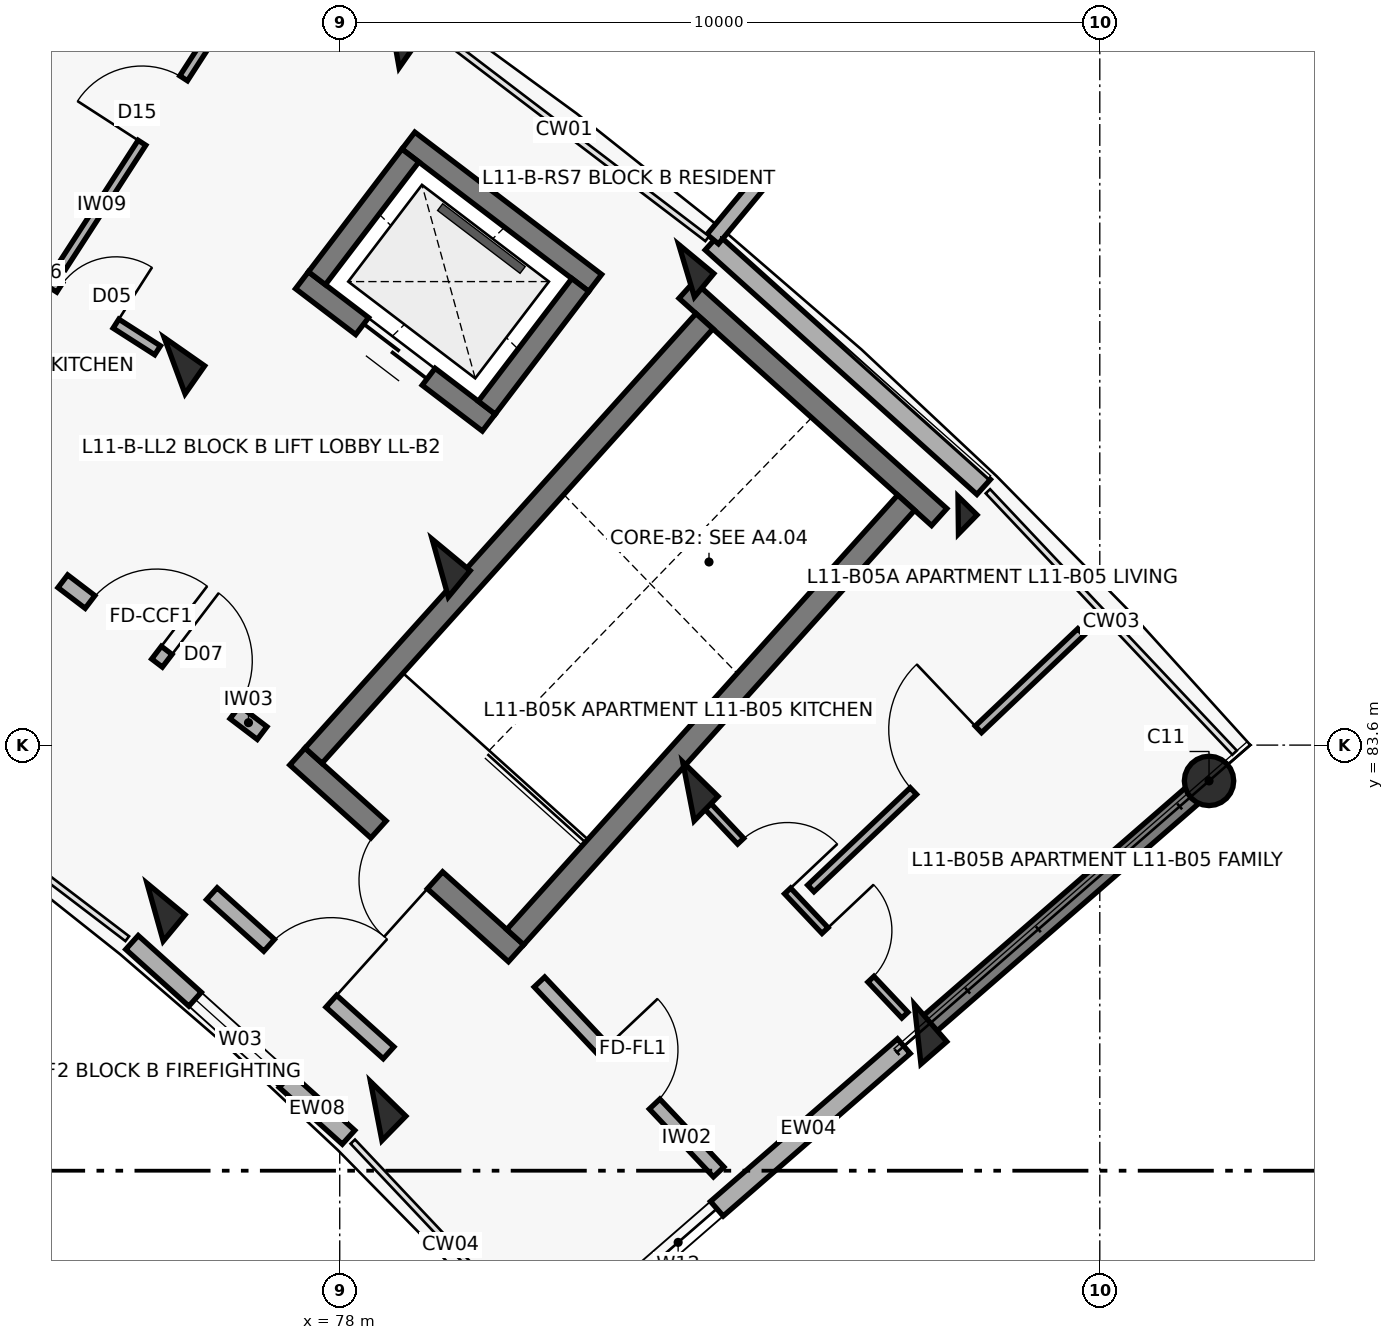
"""IFC4 building model, lengths in metres.
Left out: names, types, materials, properties, quantities, classifications, styles, units other than length and angle.
Written with IfcOpenShell. Run it as: python <this file> out.ifc"""

import sys

from ifc_helpers import new_model, si_unit, direction, frame, frame_2d, origin, origin_2d, place, context, subcontext, project, spatial, rectangle, circle, extrude, element, fill, save


model = new_model("IFC4")
c1 = context("Model", 3, precision=1e-05, world=origin(), true_north=direction((0.0, 1.0)))
c2 = subcontext(c1, "Body", "Model", "MODEL_VIEW")
j1 = project(units=[si_unit("LENGTHUNIT", "METRE"), si_unit("PLANEANGLEUNIT", "RADIAN")], contexts=[c1])
p1 = place(None, origin())
s1 = spatial("IfcSite", under=j1, at=p1, CompositionType="ELEMENT")
p2 = place(p1, origin())
s2 = spatial("IfcBuilding", under=s1, at=p2, CompositionType="ELEMENT")
p3 = place(p2, frame((0.0, 0.0, 36.0)))
s3 = spatial("IfcBuildingStorey", under=s2, at=p3, CompositionType="ELEMENT", Elevation=36.0)
p4 = place(p3, frame((75.828, 88.592, 0.0), z_axis=(0.0, 0.0, 1.0), x_axis=(0.573004420611, 0.819552276527, 0.0)))
e1 = element("IfcColumn", 1, at=p4, inside=s3, PredefinedType="COLUMN", context=c2, shape_type="SweptSolid", body=[
    extrude(rectangle(XDim=0.45, YDim=0.65, at=origin_2d()), origin(), (0.0, 0.0, 1.0), 3.1),
])
p5 = place(p3, frame((78.739, 92.755, 0.0), z_axis=(0.0, 0.0, 1.0), x_axis=(0.573004420611, 0.819552276527, 0.0)))
e2 = element("IfcColumn", 2, at=p5, inside=s3, PredefinedType="COLUMN", context=c2, shape_type="SweptSolid", body=[
    extrude(rectangle(XDim=0.35, YDim=0.35, at=origin_2d()), origin(), (0.0, 0.0, 1.0), 3.1),
])
for number, where, z_axis, x_axis in (
    (3, (75.571, 81.402, 0.0), (0.0, 0.0, 1.0), (0.638, 0.77, 0.0)),
    (4, (79.322, 85.93, 0.0), (0.0, 0.0, 1.0), (0.638, 0.77, 0.0)),
):
    element("IfcColumn", number, at=place(p3, frame(where, z_axis=z_axis, x_axis=x_axis)), inside=s3, PredefinedType="COLUMN", context=c2, shape_type="SweptSolid", body=[
        extrude(rectangle(XDim=0.45, YDim=0.65, at=origin_2d()), origin(), (0.0, 0.0, 1.0), 3.1),
    ])
p6 = place(p3, frame((82.563, 89.842, 0.0), z_axis=(0.0, 0.0, 1.0), x_axis=(0.637961754089, 0.770068049148, 0.0)))
e5 = element("IfcColumn", 5, at=p6, inside=s3, PredefinedType="COLUMN", context=c2, shape_type="SweptSolid", body=[
    extrude(rectangle(XDim=0.4, YDim=0.6, at=origin_2d()), origin(), (0.0, 0.0, 1.0), 3.1),
])
for number, where, z_axis, x_axis in (
    (6, (78.48, 78.784, 0.0), (0.0, 0.0, 1.0), (0.699, 0.715, 0.0)),
    (7, (82.588, 82.991, 0.0), (0.0, 0.0, 1.0), (0.699, 0.715, 0.0)),
):
    element("IfcColumn", number, at=place(p3, frame(where, z_axis=z_axis, x_axis=x_axis)), inside=s3, PredefinedType="COLUMN", context=c2, shape_type="SweptSolid", body=[
        extrude(rectangle(XDim=0.45, YDim=0.65, at=origin_2d()), origin(), (0.0, 0.0, 1.0), 3.1),
    ])
p7 = place(p3, frame((86.137, 86.626, 0.0), z_axis=(0.0, 0.0, 1.0), x_axis=(0.698665066769, 0.715448897181, 0.0)))
e8 = element("IfcColumn", 8, at=p7, inside=s3, PredefinedType="COLUMN", context=c2, shape_type="SweptSolid", body=[
    extrude(rectangle(XDim=0.35, YDim=0.35, at=origin_2d()), origin(), (0.0, 0.0, 1.0), 3.1),
])
p8 = place(p3, frame((85.603, 79.796, 0.0), z_axis=(0.0, 0.0, 1.0), x_axis=(0.754709580223, 0.656059028991, 0.0)))
e9 = element("IfcColumn", 9, at=p8, inside=s3, PredefinedType="COLUMN", context=c2, shape_type="SweptSolid", body=[
    extrude(rectangle(XDim=0.45, YDim=0.65, at=origin_2d()), origin(), (0.0, 0.0, 1.0), 3.1),
])
p9 = place(p3, frame((89.437, 83.129, 0.0), z_axis=(0.0, 0.0, 1.0), x_axis=(0.754709580223, 0.656059028991, 0.0)))
e10 = element("IfcColumn", 10, at=p9, inside=s3, PredefinedType="COLUMN", context=c2, shape_type="SweptSolid", body=[
    extrude(circle(Radius=0.325, at=origin_2d()), origin(), (0.0, 0.0, 1.0), 3.1),
])
p10 = place(p3, frame((85.739, 79.914, 0.0), z_axis=(0.0, 0.0, 1.0), x_axis=(0.754703505217, 0.65606601742, 0.0)))
e11 = element("IfcWall", 11, at=p10, inside=s3, PredefinedType="SHEAR", context=c2, shape_type="SweptSolid", body=[
    extrude(rectangle(XDim=4.72, YDim=0.27, at=frame_2d((2.36, 0.0))), origin(), (0.0, 0.0, 1.0), 2.92),
])
p11 = place(p3, frame((82.897, 90.213, 0.0), z_axis=(0.0, 0.0, 1.0), x_axis=(0.743387539862, -0.668860946369, 0.0)))
e12 = element("IfcWall", 12, at=p11, inside=s3, PredefinedType="SOLIDWALL", context=c2, shape_type="SweptSolid", body=[
    extrude(rectangle(XDim=4.809, YDim=0.265, at=frame_2d((2.405, 0.0))), origin(), (0.0, 0.0, 1.0), 2.25),
])
p12 = place(p3, frame((82.908, 90.257, 0.0), z_axis=(0.0, 0.0, 1.0), x_axis=(0.637967316825, 0.770063440674, 0.0)))
e13 = element("IfcWall", 13, at=p12, inside=s3, PredefinedType="PARAPET", context=c2, shape_type="SweptSolid", body=[
    extrude(rectangle(XDim=0.9, YDim=0.195, at=frame_2d((0.45, 0.0))), origin(), (0.0, 0.0, 1.0), 2.25),
])
p13 = place(p3, frame((75.267, 81.003, 0.0), z_axis=(0.0, 0.0, 1.0), x_axis=(0.743363835609, -0.668887290886, 0.0)))
e14 = element("IfcWall", 14, at=p13, inside=s3, PredefinedType="SOLIDWALL", context=c2, shape_type="SweptSolid", body=[
    extrude(rectangle(XDim=3.832, YDim=0.245, at=frame_2d((1.916, 0.0))), origin(), (0.0, 0.0, 1.0), 2.25),
])
p14 = place(p13, frame((1.116, 0.0, 0.32)))
e15 = element("IfcOpeningElement", 15, at=p14, cuts=e14, PredefinedType="OPENING", context=c2, shape_type="SweptSolid", body=[
    extrude(rectangle(XDim=1.6, YDim=1.5, at=frame_2d((0.8, 0.75))), frame((0.0, 0.133, 0.0), z_axis=(0.0, -1.0, 0.0), x_axis=(1.0, 0.0, 0.0)), (0.0, 0.0, 1.0), 0.265),
])
p15 = place(p3, frame((81.347, 76.096, 0.0), z_axis=(0.0, 0.0, 1.0), x_axis=(0.754709658894, 0.65605893849, 0.0)))
e16 = element("IfcWall", 16, at=p15, inside=s3, PredefinedType="SOLIDWALL", context=c2, shape_type="SweptSolid", body=[
    extrude(rectangle(XDim=5.4, YDim=0.255, at=frame_2d((2.7, 0.0))), origin(), (0.0, 0.0, 1.0), 2.24),
])
p16 = place(p15, frame((0.79, 0.0, 0.75)))
e17 = element("IfcOpeningElement", 17, at=p16, cuts=e16, PredefinedType="OPENING", context=c2, shape_type="SweptSolid", body=[
    extrude(rectangle(XDim=1.35, YDim=1.35, at=frame_2d((0.675, 0.675))), frame((0.0, 0.137, 0.0), z_axis=(0.0, -1.0, 0.0), x_axis=(1.0, 0.0, 0.0)), (0.0, 0.0, 1.0), 0.275),
])
p17 = place(p3, frame((80.32, 80.862, 0.0), z_axis=(0.0, 0.0, 1.0), x_axis=(-0.743375696158, 0.668874109501, 0.0)))
e18 = element("IfcWall", 18, at=p17, inside=s3, PredefinedType="SHEAR", context=c2, shape_type="SweptSolid", body=[
    extrude(rectangle(XDim=3.87, YDim=0.3, at=frame_2d((1.935, 0.0))), origin(), (0.0, 0.0, 1.0), 3.1),
])
p18 = place(p17, frame((1.435, 0.0, 0.0)))
e19 = element("IfcOpeningElement", 19, at=p18, cuts=e18, PredefinedType="OPENING", context=c2, shape_type="SweptSolid", body=[
    extrude(rectangle(XDim=1.0, YDim=2.15, at=frame_2d((0.5, 1.075))), frame((0.0, 0.16, 0.0), z_axis=(0.0, -1.0, 0.0), x_axis=(1.0, 0.0, 0.0)), (0.0, 0.0, 1.0), 0.32),
])
p19 = place(p3, frame((85.887, 86.601, 0.0), z_axis=(0.0, 0.0, 1.0), x_axis=(-0.743400052815, 0.668847038922, 0.0)))
e20 = element("IfcWall", 20, at=p19, inside=s3, PredefinedType="SHEAR", context=c2, shape_type="SweptSolid", body=[
    extrude(rectangle(XDim=4.47, YDim=0.3, at=frame_2d((2.235, 0.0))), origin(), (0.0, 0.0, 1.0), 3.1),
])
p20 = place(p3, frame((80.309, 81.073, 0.0), z_axis=(0.0, 0.0, 1.0), x_axis=(0.668885797871, 0.743365179038, 0.0)))
e21 = element("IfcWall", 21, at=p20, inside=s3, PredefinedType="SHEAR", context=c2, shape_type="SweptSolid", body=[
    extrude(rectangle(XDim=7.69, YDim=0.3, at=frame_2d((3.845, 0.0))), origin(), (0.0, 0.0, 1.0), 3.1),
])
p21 = place(p3, frame((77.655, 83.461, 0.0), z_axis=(0.0, 0.0, 1.0), x_axis=(0.668868253964, 0.743380964808, 0.0)))
e22 = element("IfcWall", 22, at=p21, inside=s3, PredefinedType="SHEAR", context=c2, shape_type="SweptSolid", body=[
    extrude(rectangle(XDim=7.69, YDim=0.3, at=frame_2d((3.845, 0.0))), origin(), (0.0, 0.0, 1.0), 3.1),
])
p22 = place(p3, frame((79.961, 87.844, 0.0), z_axis=(0.0, 0.0, 1.0), x_axis=(-0.795464365424, 0.606000365793, 0.0)))
e23 = element("IfcWall", 23, at=p22, inside=s3, PredefinedType="SHEAR", context=c2, shape_type="SweptSolid", body=[
    extrude(rectangle(XDim=3.09, YDim=0.28, at=frame_2d((1.545, 0.0))), origin(), (0.0, 0.0, 1.0), 3.1),
])
p23 = place(p22, frame((0.995, 0.0, 0.0)))
e24 = element("IfcOpeningElement", 24, at=p23, cuts=e23, PredefinedType="OPENING", context=c2, shape_type="SweptSolid", body=[
    extrude(rectangle(XDim=1.1, YDim=2.15, at=frame_2d((0.55, 1.075))), frame((0.0, 0.15, 0.0), z_axis=(0.0, -1.0, 0.0), x_axis=(1.0, 0.0, 0.0)), (0.0, 0.0, 1.0), 0.3),
])
p24 = place(p3, frame((81.361, 89.681, 0.0), z_axis=(0.0, 0.0, 1.0), x_axis=(-0.795502452183, 0.605950368076, 0.0)))
e25 = element("IfcWall", 25, at=p24, inside=s3, PredefinedType="SHEAR", context=c2, shape_type="SweptSolid", body=[
    extrude(rectangle(XDim=3.09, YDim=0.28, at=frame_2d((1.545, 0.0))), origin(), (0.0, 0.0, 1.0), 3.1),
])
for number, where, z_axis, x_axis in (
    (26, (79.935, 88.04, 0.0), (0.0, 0.0, 1.0), (0.606, 0.795, 0.0)),
    (27, (77.699, 89.743, 0.0), (0.0, 0.0, 1.0), (0.606, 0.795, 0.0)),
):
    element("IfcWall", number, at=place(p3, frame(where, z_axis=z_axis, x_axis=x_axis)), inside=s3, PredefinedType="SHEAR", context=c2, shape_type="SweptSolid", body=[
        extrude(rectangle(XDim=2.03, YDim=0.28, at=frame_2d((1.015, 0.0))), origin(), (0.0, 0.0, 1.0), 3.1),
    ])
p25 = place(p3, frame((72.405, 90.842, 0.0), z_axis=(0.0, 0.0, 1.0), x_axis=(0.842271400662, -0.539053696423, 0.0)))
e28 = element("IfcWall", 28, at=p25, inside=s3, PredefinedType="PARTITIONING", context=c2, shape_type="SweptSolid", body=[
    extrude(rectangle(XDim=3.797, YDim=0.14, at=frame_2d((1.898, 0.0))), origin(), (0.0, 0.0, 1.0), 2.14),
])
p26 = place(p25, frame((0.65, 0.0, 0.0)))
e29 = element("IfcOpeningElement", 29, at=p26, cuts=e28, PredefinedType="OPENING", context=c2, shape_type="SweptSolid", body=[
    extrude(rectangle(XDim=0.9, YDim=2.1, at=frame_2d((0.45, 1.05))), frame((0.0, 0.08, 0.0), z_axis=(0.0, -1.0, 0.0), x_axis=(1.0, 0.0, 0.0)), (0.0, 0.0, 1.0), 0.16),
])
p27 = place(p25, frame((2.267, 0.0, 0.0)))
e30 = element("IfcOpeningElement", 30, at=p27, cuts=e28, PredefinedType="OPENING", context=c2, shape_type="SweptSolid", body=[
    extrude(rectangle(XDim=0.88, YDim=2.1, at=frame_2d((0.44, 1.05))), frame((0.0, 0.08, 0.0), z_axis=(0.0, -1.0, 0.0), x_axis=(1.0, 0.0, 0.0)), (0.0, 0.0, 1.0), 0.16),
])
p28 = place(p3, frame((74.342, 89.892, 0.0), z_axis=(0.0, 0.0, 1.0), x_axis=(0.542871109654, 0.839816026462, 0.0)))
e31 = element("IfcWall", 31, at=p28, inside=s3, PredefinedType="PARTITIONING", context=c2, shape_type="SweptSolid", body=[
    extrude(rectangle(XDim=4.9, YDim=0.12, at=frame_2d((2.45, 0.0))), origin(), (0.0, 0.0, 1.0), 2.14),
])
p29 = place(p28, frame((1.945, 0.0, 0.0)))
e32 = element("IfcOpeningElement", 32, at=p29, cuts=e31, PredefinedType="OPENING", context=c2, shape_type="SweptSolid", body=[
    extrude(rectangle(XDim=1.01, YDim=2.1, at=frame_2d((0.505, 1.05))), frame((0.0, 0.07, 0.0), z_axis=(0.0, -1.0, 0.0), x_axis=(1.0, 0.0, 0.0)), (0.0, 0.0, 1.0), 0.14),
])
p30 = place(p3, frame((72.379, 91.392, 0.0), z_axis=(0.0, 0.0, 1.0), x_axis=(0.504216452091, 0.863577309475, 0.0)))
e33 = element("IfcWall", 33, at=p30, inside=s3, PredefinedType="SOLIDWALL", context=c2, shape_type="SweptSolid", body=[
    extrude(rectangle(XDim=4.35, YDim=0.185, at=frame_2d((2.175, 0.0))), origin(), (0.0, 0.0, 1.0), 2.14),
])
p31 = place(p3, frame((74.357, 85.756, 0.0), z_axis=(0.0, 0.0, 1.0), x_axis=(0.795498026433, -0.605956178235, 0.0)))
e34 = element("IfcWall", 34, at=p31, inside=s3, PredefinedType="SOLIDWALL", context=c2, shape_type="SweptSolid", body=[
    extrude(rectangle(XDim=3.296, YDim=0.21, at=frame_2d((1.648, 0.0))), origin(), (0.0, 0.0, 1.0), 2.14),
])
p32 = place(p31, frame((0.45, 0.0, 0.0)))
e35 = element("IfcOpeningElement", 35, at=p32, cuts=e34, PredefinedType="OPENING", context=c2, shape_type="SweptSolid", body=[
    extrude(rectangle(XDim=1.1, YDim=2.15, at=frame_2d((0.55, 1.075))), frame((0.0, 0.115, 0.0), z_axis=(0.0, -1.0, 0.0), x_axis=(1.0, 0.0, 0.0)), (0.0, 0.0, 1.0), 0.23),
])
p33 = place(p31, frame((1.726, 0.0, 0.0)))
e36 = element("IfcOpeningElement", 36, at=p33, cuts=e34, PredefinedType="OPENING", context=c2, shape_type="SweptSolid", body=[
    extrude(rectangle(XDim=1.12, YDim=2.15, at=frame_2d((0.56, 1.075))), frame((0.0, 0.115, 0.0), z_axis=(0.0, -1.0, 0.0), x_axis=(1.0, 0.0, 0.0)), (0.0, 0.0, 1.0), 0.23),
])
p34 = place(p3, frame((76.317, 81.644, 0.0), z_axis=(0.0, 0.0, 1.0), x_axis=(0.743387266925, -0.668861249718, 0.0)))
e37 = element("IfcWall", 37, at=p34, inside=s3, PredefinedType="SOLIDWALL", context=c2, shape_type="SweptSolid", body=[
    extrude(rectangle(XDim=3.128, YDim=0.21, at=frame_2d((1.564, 0.0))), origin(), (0.0, 0.0, 1.0), 2.14),
])
p35 = place(p34, frame((1.014, 0.0, 0.0)))
e38 = element("IfcOpeningElement", 38, at=p35, cuts=e37, PredefinedType="OPENING", context=c2, shape_type="SweptSolid", body=[
    extrude(rectangle(XDim=1.1, YDim=2.15, at=frame_2d((0.55, 1.075))), frame((0.0, 0.115, 0.0), z_axis=(0.0, -1.0, 0.0), x_axis=(1.0, 0.0, 0.0)), (0.0, 0.0, 1.0), 0.23),
])
p36 = place(p3, frame((80.628, 80.483, 0.0), z_axis=(0.0, 0.0, 1.0), x_axis=(0.686310507227, -0.727308660522, 0.0)))
e39 = element("IfcWall", 39, at=p36, inside=s3, PredefinedType="SOLIDWALL", context=c2, shape_type="SweptSolid", body=[
    extrude(rectangle(XDim=3.436, YDim=0.19, at=frame_2d((1.718, 0.0))), origin(), (0.0, 0.0, 1.0), 2.14),
])
p37 = place(p36, frame((1.228, 0.0, 0.0)))
e40 = element("IfcOpeningElement", 40, at=p37, cuts=e39, PredefinedType="OPENING", context=c2, shape_type="SweptSolid", body=[
    extrude(rectangle(XDim=0.98, YDim=2.15, at=frame_2d((0.49, 1.075))), frame((0.0, 0.105, 0.0), z_axis=(0.0, -1.0, 0.0), x_axis=(1.0, 0.0, 0.0)), (0.0, 0.0, 1.0), 0.21),
])
p38 = place(p3, frame((82.829, 82.809, 0.0), z_axis=(0.0, 0.0, 1.0), x_axis=(0.686300649561, -0.727317962388, 0.0)))
e41 = element("IfcWall", 41, at=p38, inside=s3, PredefinedType="PARTITIONING", context=c2, shape_type="SweptSolid", body=[
    extrude(rectangle(XDim=3.797, YDim=0.11, at=frame_2d((1.899, 0.0))), origin(), (0.0, 0.0, 1.0), 2.14),
])
p39 = place(p38, frame((0.65, 0.0, 0.0)))
e42 = element("IfcOpeningElement", 42, at=p39, cuts=e41, PredefinedType="OPENING", context=c2, shape_type="SweptSolid", body=[
    extrude(rectangle(XDim=0.9, YDim=2.1, at=frame_2d((0.45, 1.05))), frame((0.0, 0.065, 0.0), z_axis=(0.0, -1.0, 0.0), x_axis=(1.0, 0.0, 0.0)), (0.0, 0.0, 1.0), 0.13),
])
p40 = place(p38, frame((2.267, 0.0, 0.0)))
e43 = element("IfcOpeningElement", 43, at=p40, cuts=e41, PredefinedType="OPENING", context=c2, shape_type="SweptSolid", body=[
    extrude(rectangle(XDim=0.88, YDim=2.1, at=frame_2d((0.44, 1.05))), frame((0.0, 0.065, 0.0), z_axis=(0.0, -1.0, 0.0), x_axis=(1.0, 0.0, 0.0)), (0.0, 0.0, 1.0), 0.13),
])
p41 = place(p3, frame((84.198, 81.714, 0.0), z_axis=(0.0, 0.0, 1.0), x_axis=(0.725204659953, 0.688533369694, 0.0)))
e44 = element("IfcWall", 44, at=p41, inside=s3, PredefinedType="PARTITIONING", context=c2, shape_type="SweptSolid", body=[
    extrude(rectangle(XDim=4.9, YDim=0.12, at=frame_2d((2.45, 0.0))), origin(), (0.0, 0.0, 1.0), 2.14),
])
p42 = place(p41, frame((1.86, 0.0, 0.0)))
e45 = element("IfcOpeningElement", 45, at=p42, cuts=e44, PredefinedType="OPENING", context=c2, shape_type="SweptSolid", body=[
    extrude(rectangle(XDim=1.18, YDim=2.1, at=frame_2d((0.59, 1.05))), frame((0.0, 0.07, 0.0), z_axis=(0.0, -1.0, 0.0), x_axis=(1.0, 0.0, 0.0)), (0.0, 0.0, 1.0), 0.14),
])
p43 = place(p14, origin())
e46 = element("IfcWindow", 46, at=p43, inside=s3, PartitioningType="DOUBLE_PANEL_VERTICAL", PredefinedType="WINDOW", context=c2, shape_type="SweptSolid", body=[
    extrude(rectangle(XDim=1.6, YDim=1.5, at=frame_2d((0.8, 0.75))), frame((0.0, 0.03, 0.0), z_axis=(0.0, -1.0, 0.0), x_axis=(1.0, 0.0, 0.0)), (0.0, 0.0, 1.0), 0.06),
])
fill(e15, e46)
p44 = place(p16, origin())
e47 = element("IfcWindow", 47, at=p44, inside=s3, PartitioningType="DOUBLE_PANEL_VERTICAL", PredefinedType="WINDOW", context=c2, shape_type="SweptSolid", body=[
    extrude(rectangle(XDim=1.35, YDim=1.35, at=frame_2d((0.675, 0.675))), frame((0.0, 0.03, 0.0), z_axis=(0.0, -1.0, 0.0), x_axis=(1.0, 0.0, 0.0)), (0.0, 0.0, 1.0), 0.06),
])
fill(e17, e47)
p45 = place(p18, origin())
e48 = element("IfcDoor", 48, at=p45, inside=s3, OperationType="SINGLE_SWING_LEFT", PredefinedType="DOOR", context=c2, shape_type="SweptSolid", body=[
    extrude(rectangle(XDim=1.0, YDim=2.15, at=frame_2d((0.5, 1.075))), frame((0.0, 0.025, 0.0), z_axis=(0.0, -1.0, 0.0), x_axis=(1.0, 0.0, 0.0)), (0.0, 0.0, 1.0), 0.05),
])
fill(e19, e48)
p46 = place(p23, origin())
e49 = element("IfcDoor", 49, at=p46, inside=s3, OperationType="DOUBLE_DOOR_SLIDING", PredefinedType="DOOR", context=c2, shape_type="SweptSolid", body=[
    extrude(rectangle(XDim=1.1, YDim=2.15, at=frame_2d((0.55, 1.075))), frame((0.0, 0.025, 0.0), z_axis=(0.0, -1.0, 0.0), x_axis=(1.0, 0.0, 0.0)), (0.0, 0.0, 1.0), 0.05),
])
fill(e24, e49)
p47 = place(p27, origin())
e50 = element("IfcDoor", 50, at=p47, inside=s3, OperationType="SINGLE_SWING_RIGHT", PredefinedType="DOOR", context=c2, shape_type="SweptSolid", body=[
    extrude(rectangle(XDim=0.88, YDim=2.1, at=frame_2d((0.44, 1.05))), frame((0.0, 0.025, 0.0), z_axis=(0.0, -1.0, 0.0), x_axis=(1.0, 0.0, 0.0)), (0.0, 0.0, 1.0), 0.05),
])
fill(e30, e50)
p48 = place(p29, origin())
e51 = element("IfcDoor", 51, at=p48, inside=s3, OperationType="SINGLE_SWING_LEFT", PredefinedType="DOOR", context=c2, shape_type="SweptSolid", body=[
    extrude(rectangle(XDim=1.01, YDim=2.1, at=frame_2d((0.505, 1.05))), frame((0.0, 0.025, 0.0), z_axis=(0.0, -1.0, 0.0), x_axis=(1.0, 0.0, 0.0)), (0.0, 0.0, 1.0), 0.05),
])
fill(e32, e51)
p49 = place(p32, origin())
e52 = element("IfcDoor", 52, at=p49, inside=s3, OperationType="SINGLE_SWING_RIGHT", PredefinedType="DOOR", context=c2, shape_type="SweptSolid", body=[
    extrude(rectangle(XDim=1.1, YDim=2.15, at=frame_2d((0.55, 1.075))), frame((0.0, 0.025, 0.0), z_axis=(0.0, -1.0, 0.0), x_axis=(1.0, 0.0, 0.0)), (0.0, 0.0, 1.0), 0.05),
])
fill(e35, e52)
p50 = place(p33, origin())
e53 = element("IfcDoor", 53, at=p50, inside=s3, OperationType="SINGLE_SWING_LEFT", PredefinedType="DOOR", context=c2, shape_type="SweptSolid", body=[
    extrude(rectangle(XDim=1.12, YDim=2.15, at=frame_2d((0.56, 1.075))), frame((0.0, 0.025, 0.0), z_axis=(0.0, -1.0, 0.0), x_axis=(1.0, 0.0, 0.0)), (0.0, 0.0, 1.0), 0.05),
])
fill(e36, e53)
p51 = place(p35, origin())
e54 = element("IfcDoor", 54, at=p51, inside=s3, OperationType="SINGLE_SWING_RIGHT", PredefinedType="DOOR", context=c2, shape_type="SweptSolid", body=[
    extrude(rectangle(XDim=1.1, YDim=2.15, at=frame_2d((0.55, 1.075))), frame((0.0, 0.025, 0.0), z_axis=(0.0, -1.0, 0.0), x_axis=(1.0, 0.0, 0.0)), (0.0, 0.0, 1.0), 0.05),
])
fill(e38, e54)
p52 = place(p37, origin())
e55 = element("IfcDoor", 55, at=p52, inside=s3, OperationType="SINGLE_SWING_LEFT", PredefinedType="DOOR", context=c2, shape_type="SweptSolid", body=[
    extrude(rectangle(XDim=0.98, YDim=2.15, at=frame_2d((0.49, 1.075))), frame((0.0, 0.025, 0.0), z_axis=(0.0, -1.0, 0.0), x_axis=(1.0, 0.0, 0.0)), (0.0, 0.0, 1.0), 0.05),
])
fill(e40, e55)
p53 = place(p39, origin())
e56 = element("IfcDoor", 56, at=p53, inside=s3, OperationType="SINGLE_SWING_RIGHT", PredefinedType="DOOR", context=c2, shape_type="SweptSolid", body=[
    extrude(rectangle(XDim=0.9, YDim=2.1, at=frame_2d((0.45, 1.05))), frame((0.0, 0.025, 0.0), z_axis=(0.0, -1.0, 0.0), x_axis=(1.0, 0.0, 0.0)), (0.0, 0.0, 1.0), 0.05),
])
fill(e42, e56)
p54 = place(p40, origin())
e57 = element("IfcDoor", 57, at=p54, inside=s3, OperationType="SINGLE_SWING_LEFT", PredefinedType="DOOR", context=c2, shape_type="SweptSolid", body=[
    extrude(rectangle(XDim=0.88, YDim=2.1, at=frame_2d((0.44, 1.05))), frame((0.0, 0.025, 0.0), z_axis=(0.0, -1.0, 0.0), x_axis=(1.0, 0.0, 0.0)), (0.0, 0.0, 1.0), 0.05),
])
fill(e43, e57)
p55 = place(p42, origin())
e58 = element("IfcDoor", 58, at=p55, inside=s3, OperationType="SINGLE_SWING_RIGHT", PredefinedType="DOOR", context=c2, shape_type="SweptSolid", body=[
    extrude(rectangle(XDim=1.18, YDim=2.1, at=frame_2d((0.59, 1.05))), frame((0.0, 0.025, 0.0), z_axis=(0.0, -1.0, 0.0), x_axis=(1.0, 0.0, 0.0)), (0.0, 0.0, 1.0), 0.05),
])
fill(e45, e58)
save(model, sys.argv[1])
